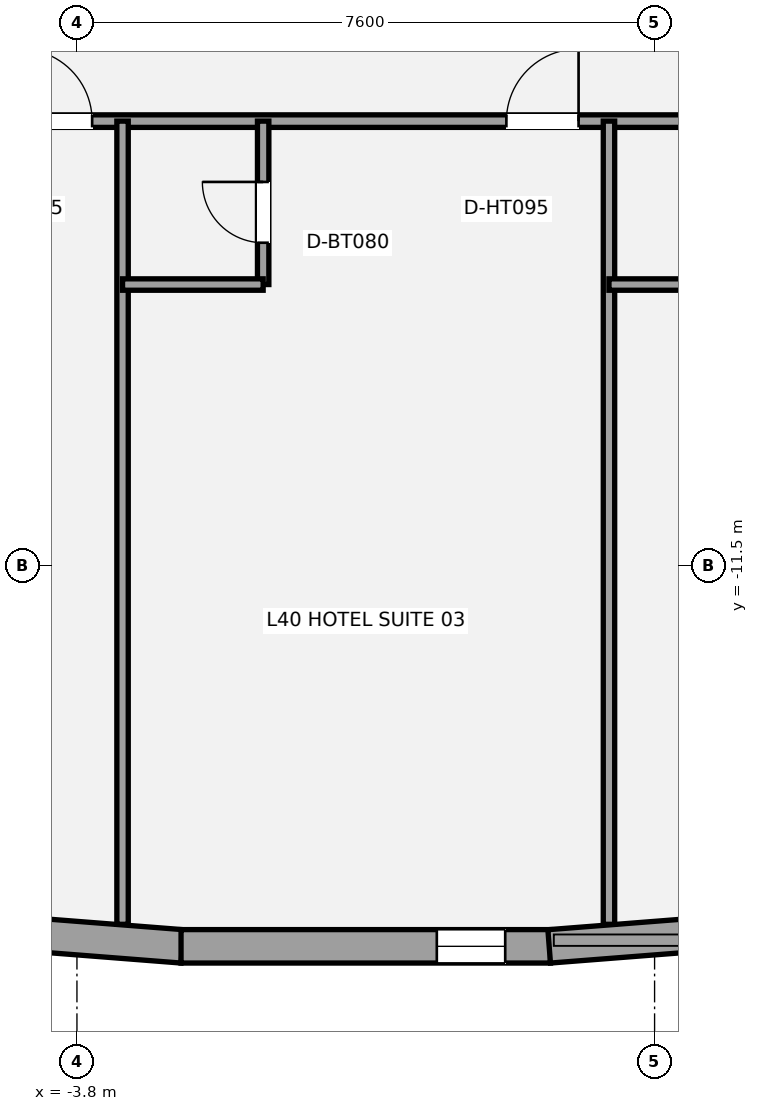
"""IFC4 building model, lengths in metres.
Left out: names, types, materials, properties, quantities, classifications, styles, units other than length and angle.
Written with IfcOpenShell. Run it as: python <this file> out.ifc"""

import sys

from ifc_helpers import new_model, si_unit, direction, frame, frame_2d, origin, place, context, subcontext, project, spatial, rectangle, extrude, element, fill, save


model = new_model("IFC4")
c1 = context("Model", 3, precision=1e-05, world=origin(), true_north=direction((0.0, 1.0)))
c2 = subcontext(c1, "Body", "Model", "MODEL_VIEW")
j1 = project(units=[si_unit("LENGTHUNIT", "METRE"), si_unit("PLANEANGLEUNIT", "RADIAN")], contexts=[c1])
p1 = place(None, origin())
s1 = spatial("IfcSite", under=j1, at=p1, CompositionType="ELEMENT")
p2 = place(p1, origin())
s2 = spatial("IfcBuilding", under=s1, at=p2, CompositionType="ELEMENT")
p3 = place(p2, frame((0.0, 0.0, 150.2)))
s3 = spatial("IfcBuildingStorey", under=s2, at=p3, CompositionType="ELEMENT", Elevation=150.2)
p4 = place(p3, frame((-2.413, -16.507, 0.0), z_axis=(0.0, 0.0, 1.0), x_axis=(-0.996946218403, 0.078091213409, 0.0)))
e1 = element("IfcWall", 1, at=p4, inside=s3, PredefinedType="STANDARD", context=c2, shape_type="SweptSolid", body=[
    extrude(rectangle(XDim=4.899, YDim=0.44, at=frame_2d((2.449, 0.0))), origin(), (0.0, 0.0, 1.0), 2.315),
])
p5 = place(p4, frame((3.349, 0.0, 0.58)))
e2 = element("IfcOpeningElement", 2, at=p5, cuts=e1, PredefinedType="OPENING", context=c2, shape_type="SweptSolid", body=[
    extrude(rectangle(XDim=0.9, YDim=1.35, at=frame_2d((0.45, 0.675))), frame((0.0, 0.23, 0.0), z_axis=(0.0, -1.0, 0.0), x_axis=(1.0, 0.0, 0.0)), (0.0, 0.0, 1.0), 0.46),
])
p6 = place(p3, frame((2.43, -16.507, 0.0), z_axis=(0.0, 0.0, 1.0), x_axis=(-1.0, 0.0, 0.0)))
e3 = element("IfcWall", 3, at=p6, inside=s3, PredefinedType="STANDARD", context=c2, shape_type="SweptSolid", body=[
    extrude(rectangle(XDim=4.861, YDim=0.44, at=frame_2d((2.43, 0.0))), origin(), (0.0, 0.0, 1.0), 2.315),
])
p7 = place(p6, frame((0.596, 0.0, 0.58)))
e4 = element("IfcOpeningElement", 4, at=p7, cuts=e3, PredefinedType="OPENING", context=c2, shape_type="SweptSolid", body=[
    extrude(rectangle(XDim=0.9, YDim=1.35, at=frame_2d((0.45, 0.675))), frame((0.0, 0.23, 0.0), z_axis=(0.0, -1.0, 0.0), x_axis=(1.0, 0.0, 0.0)), (0.0, 0.0, 1.0), 0.46),
])
p8 = place(p3, frame((7.297, -16.125, 0.0), z_axis=(0.0, 0.0, 1.0), x_axis=(-0.996946218403, -0.078091213409, 0.0)))
e5 = element("IfcWall", 5, at=p8, inside=s3, PredefinedType="STANDARD", context=c2, shape_type="SweptSolid", body=[
    extrude(rectangle(XDim=4.899, YDim=0.44, at=frame_2d((2.449, 0.0))), origin(), (0.0, 0.0, 1.0), 2.315),
])
p9 = place(p8, frame((0.55, 0.0, 0.58)))
e6 = element("IfcOpeningElement", 6, at=p9, cuts=e5, PredefinedType="OPENING", context=c2, shape_type="SweptSolid", body=[
    extrude(rectangle(XDim=0.9, YDim=1.35, at=frame_2d((0.45, 0.675))), frame((0.0, 0.23, 0.0), z_axis=(0.0, -1.0, 0.0), x_axis=(1.0, 0.0, 0.0)), (0.0, 0.0, 1.0), 0.46),
])
p10 = place(p3, frame((-15.55, -5.65, 0.0), z_axis=(0.0, 0.0, 1.0), x_axis=(1.0, 0.0, 0.0)))
e7 = element("IfcWall", 7, at=p10, inside=s3, PredefinedType="PARTITIONING", context=c2, shape_type="SweptSolid", body=[
    extrude(rectangle(XDim=31.1, YDim=0.165, at=frame_2d((15.55, 0.0))), origin(), (0.0, 0.0, 1.0), 2.398),
])
p11 = place(p10, frame((4.6, 0.0, 0.0)))
e8 = element("IfcOpeningElement", 8, at=p11, cuts=e7, PredefinedType="OPENING", context=c2, shape_type="SweptSolid", body=[
    extrude(rectangle(XDim=0.95, YDim=2.15, at=frame_2d((0.475, 1.075))), frame((0.0, 0.093, 0.0), z_axis=(0.0, -1.0, 0.0), x_axis=(1.0, 0.0, 0.0)), (0.0, 0.0, 1.0), 0.185),
])
p12 = place(p10, frame((11.0, 0.0, 0.0)))
e9 = element("IfcOpeningElement", 9, at=p12, cuts=e7, PredefinedType="OPENING", context=c2, shape_type="SweptSolid", body=[
    extrude(rectangle(XDim=0.95, YDim=2.15, at=frame_2d((0.475, 1.075))), frame((0.0, 0.093, 0.0), z_axis=(0.0, -1.0, 0.0), x_axis=(1.0, 0.0, 0.0)), (0.0, 0.0, 1.0), 0.185),
])
p13 = place(p10, frame((17.4, 0.0, 0.0)))
e10 = element("IfcOpeningElement", 10, at=p13, cuts=e7, PredefinedType="OPENING", context=c2, shape_type="SweptSolid", body=[
    extrude(rectangle(XDim=0.95, YDim=2.15, at=frame_2d((0.475, 1.075))), frame((0.0, 0.093, 0.0), z_axis=(0.0, -1.0, 0.0), x_axis=(1.0, 0.0, 0.0)), (0.0, 0.0, 1.0), 0.185),
])
p14 = place(p10, frame((23.8, 0.0, 0.0)))
e11 = element("IfcOpeningElement", 11, at=p14, cuts=e7, PredefinedType="OPENING", context=c2, shape_type="SweptSolid", body=[
    extrude(rectangle(XDim=0.95, YDim=2.15, at=frame_2d((0.475, 1.075))), frame((0.0, 0.093, 0.0), z_axis=(0.0, -1.0, 0.0), x_axis=(1.0, 0.0, 0.0)), (0.0, 0.0, 1.0), 0.185),
])
p15 = place(p10, frame((29.75, 0.0, 0.0)))
e12 = element("IfcOpeningElement", 12, at=p15, cuts=e7, PredefinedType="OPENING", context=c2, shape_type="SweptSolid", body=[
    extrude(rectangle(XDim=0.95, YDim=2.15, at=frame_2d((0.475, 1.075))), frame((0.0, 0.093, 0.0), z_axis=(0.0, -1.0, 0.0), x_axis=(1.0, 0.0, 0.0)), (0.0, 0.0, 1.0), 0.185),
])
p16 = place(p3, frame((-3.2, -16.217, 0.0), z_axis=(0.0, 0.0, 1.0), x_axis=(0.0, 1.0, 0.0)))
e13 = element("IfcWall", 13, at=p16, inside=s3, PredefinedType="PLUMBINGWALL", context=c2, shape_type="SweptSolid", body=[
    extrude(rectangle(XDim=10.567, YDim=0.15, at=frame_2d((5.283, 0.0))), origin(), (0.0, 0.0, 1.0), 3.02),
])
p17 = place(p3, frame((3.2, -16.217, 0.0), z_axis=(0.0, 0.0, 1.0), x_axis=(0.0, 1.0, 0.0)))
e14 = element("IfcWall", 14, at=p17, inside=s3, PredefinedType="PLUMBINGWALL", context=c2, shape_type="SweptSolid", body=[
    extrude(rectangle(XDim=10.567, YDim=0.15, at=frame_2d((5.283, 0.0))), origin(), (0.0, 0.0, 1.0), 2.473),
])
p18 = place(p3, frame((-1.35, -7.8, 0.0), z_axis=(0.0, 0.0, 1.0), x_axis=(0.0, 1.0, 0.0)))
e15 = element("IfcWall", 15, at=p18, inside=s3, PredefinedType="PLUMBINGWALL", context=c2, shape_type="SweptSolid", body=[
    extrude(rectangle(XDim=2.15, YDim=0.15, at=frame_2d((1.075, 0.0))), origin(), (0.0, 0.0, 1.0), 2.473),
])
p19 = place(p18, frame((0.55, 0.0, 0.0)))
e16 = element("IfcOpeningElement", 16, at=p19, cuts=e15, PredefinedType="OPENING", context=c2, shape_type="SweptSolid", body=[
    extrude(rectangle(XDim=0.8, YDim=2.1, at=frame_2d((0.4, 1.05))), frame((0.0, 0.085, 0.0), z_axis=(0.0, -1.0, 0.0), x_axis=(1.0, 0.0, 0.0)), (0.0, 0.0, 1.0), 0.17),
])
p20 = place(p3, frame((-3.2, -7.8, 0.0), z_axis=(0.0, 0.0, 1.0), x_axis=(1.0, 0.0, 0.0)))
e17 = element("IfcWall", 17, at=p20, inside=s3, PredefinedType="PLUMBINGWALL", context=c2, shape_type="SweptSolid", body=[
    extrude(rectangle(XDim=1.85, YDim=0.15, at=frame_2d((0.925, 0.0))), origin(), (0.0, 0.0, 1.0), 3.02),
])
p21 = place(p3, frame((3.2, -7.8, 0.0), z_axis=(0.0, 0.0, 1.0), x_axis=(1.0, 0.0, 0.0)))
e18 = element("IfcWall", 18, at=p21, inside=s3, PredefinedType="PLUMBINGWALL", context=c2, shape_type="SweptSolid", body=[
    extrude(rectangle(XDim=1.85, YDim=0.15, at=frame_2d((0.925, 0.0))), origin(), (0.0, 0.0, 1.0), 3.02),
])
p22 = place(p7, origin())
e19 = element("IfcWindow", 19, at=p22, inside=s3, PartitioningType="SINGLE_PANEL", PredefinedType="WINDOW", context=c2, shape_type="SweptSolid", body=[
    extrude(rectangle(XDim=0.9, YDim=1.35, at=frame_2d((0.45, 0.675))), frame((0.0, -0.01, 0.0), z_axis=(0.0, -1.0, 0.0), x_axis=(1.0, 0.0, 0.0)), (0.0, 0.0, 1.0), 0.06),
])
fill(e4, e19)
p23 = place(p12, origin())
e20 = element("IfcDoor", 20, at=p23, inside=s3, OperationType="SINGLE_SWING_LEFT", PredefinedType="DOOR", context=c2, shape_type="SweptSolid", body=[
    extrude(rectangle(XDim=0.95, YDim=2.15, at=frame_2d((0.475, 1.075))), frame((0.0, 0.025, 0.0), z_axis=(0.0, -1.0, 0.0), x_axis=(1.0, 0.0, 0.0)), (0.0, 0.0, 1.0), 0.05),
])
fill(e9, e20)
p24 = place(p13, origin())
e21 = element("IfcDoor", 21, at=p24, inside=s3, OperationType="SINGLE_SWING_RIGHT", PredefinedType="DOOR", context=c2, shape_type="SweptSolid", body=[
    extrude(rectangle(XDim=0.95, YDim=2.15, at=frame_2d((0.475, 1.075))), frame((0.0, 0.025, 0.0), z_axis=(0.0, -1.0, 0.0), x_axis=(1.0, 0.0, 0.0)), (0.0, 0.0, 1.0), 0.05),
])
fill(e10, e21)
p25 = place(p19, origin())
e22 = element("IfcDoor", 22, at=p25, inside=s3, OperationType="SINGLE_SWING_RIGHT", PredefinedType="DOOR", context=c2, shape_type="SweptSolid", body=[
    extrude(rectangle(XDim=0.8, YDim=2.1, at=frame_2d((0.4, 1.05))), frame((0.0, 0.025, 0.0), z_axis=(0.0, -1.0, 0.0), x_axis=(1.0, 0.0, 0.0)), (0.0, 0.0, 1.0), 0.05),
])
fill(e16, e22)
save(model, sys.argv[1])
